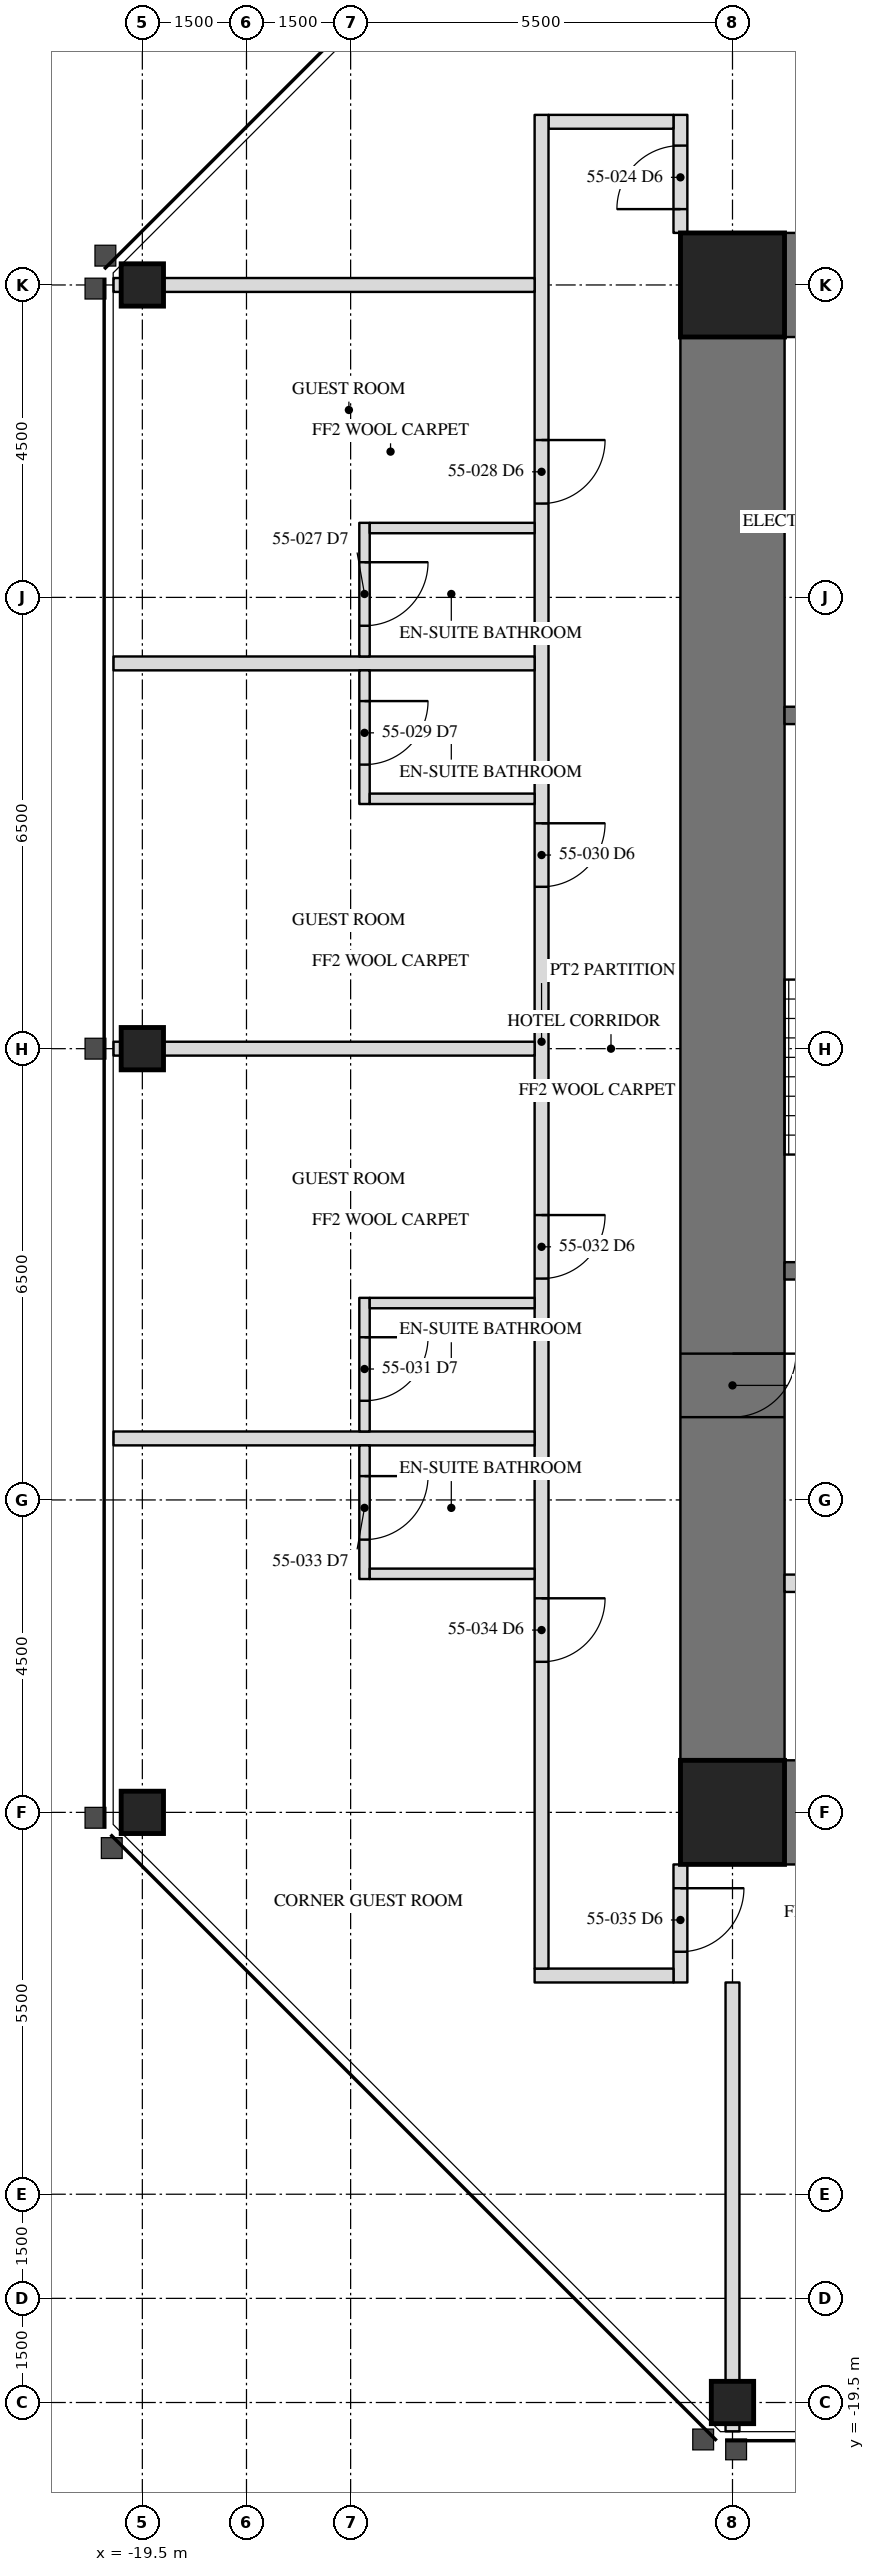
"""IFC4 building model, lengths in metres.
Left out: names, types, materials, properties, quantities, classifications, styles, units other than length and angle.
Written with IfcOpenShell. Run it as: python <this file> out.ifc"""

import sys

from ifc_helpers import new_model, si_unit, direction, frame, frame_2d, origin, origin_2d, place, context, subcontext, project, spatial, rectangle, hollow_rectangle, extrude, element, fill, save


model = new_model("IFC4")
c1 = context("Model", 3, precision=1e-05, world=origin(), true_north=direction((0.0, 1.0)))
c2 = subcontext(c1, "Body", "Model", "MODEL_VIEW")
j1 = project(units=[si_unit("LENGTHUNIT", "METRE"), si_unit("PLANEANGLEUNIT", "RADIAN")], contexts=[c1])
p1 = place(None, origin())
s1 = spatial("IfcSite", under=j1, at=p1, CompositionType="ELEMENT")
p2 = place(p1, origin())
s2 = spatial("IfcBuilding", under=s1, at=p2, CompositionType="ELEMENT")
p3 = place(p2, frame((0.0, 0.0, 229.2)))
s3 = spatial("IfcBuildingStorey", under=s2, at=p3, CompositionType="ELEMENT", Elevation=229.2)
for number, where, z_axis, x_axis in (
    (1, (-19.5, 0.0, 0.0), (0.0, 0.0, 1.0), (0.0, 1.0, 0.0)),
    (2, (-19.5, -11.0, 0.0), (0.0, 0.0, 1.0), (0.0, 1.0, 0.0)),
    (3, (-11.0, -19.5, 0.0), (0.0, 0.0, 1.0), (1.0, 0.0, 0.0)),
    (4, (-19.5, 11.0, 0.0), (0.0, 0.0, 1.0), (0.0, 1.0, 0.0)),
):
    element("IfcColumn", number, at=place(p3, frame(where, z_axis=z_axis, x_axis=x_axis)), inside=s3, PredefinedType="COLUMN", context=c2, shape_type="SweptSolid", body=[
        extrude(hollow_rectangle(XDim=0.61, YDim=0.61, WallThickness=0.076, at=origin_2d()), origin(), (0.0, 0.0, 1.0), 3.5),
    ])
p4 = place(p3, frame((-11.0, 11.0, 0.0), z_axis=(0.0, 0.0, 1.0), x_axis=(0.0, -1.0, 0.0)))
e5 = element("IfcWall", 5, at=p4, inside=s3, PredefinedType="SHEAR", context=c2, shape_type="SweptSolid", body=[
    extrude(rectangle(XDim=22.0, YDim=1.5, at=frame_2d((11.0, 0.0))), origin(), (0.0, 0.0, 1.0), 3.5),
])
p5 = place(p4, frame((15.393, 0.0, 0.0)))
e6 = element("IfcOpeningElement", 6, at=p5, cuts=e5, PredefinedType="OPENING", context=c2, shape_type="SweptSolid", body=[
    extrude(rectangle(XDim=0.915, YDim=2.134, at=frame_2d((0.458, 1.067))), frame((0.0, 0.76, 0.0), z_axis=(0.0, -1.0, 0.0), x_axis=(1.0, 0.0, 0.0)), (0.0, 0.0, 1.0), 1.52),
])
for number, where, z_axis, x_axis in (
    (7, (-6.5, 11.0, 0.0), (0.0, 0.0, 1.0), (-1.0, 0.0, 0.0)),
    (8, (-11.0, -11.0, 0.0), (0.0, 0.0, 1.0), (1.0, 0.0, 0.0)),
):
    element("IfcWall", number, at=place(p3, frame(where, z_axis=z_axis, x_axis=x_axis)), inside=s3, PredefinedType="SHEAR", context=c2, shape_type="SweptSolid", body=[
        extrude(rectangle(XDim=4.5, YDim=1.5, at=frame_2d((2.25, 0.0))), origin(), (0.0, 0.0, 1.0), 3.5),
    ])
for number, where, z_axis, x_axis in (
    (9, (-11.0, 11.0, 0.0), (0.0, 0.0, 1.0), (1.0, 0.0, 0.0)),
    (10, (-11.0, -11.0, 0.0), (0.0, 0.0, 1.0), (1.0, 0.0, 0.0)),
):
    element("IfcColumn", number, at=place(p3, frame(where, z_axis=z_axis, x_axis=x_axis)), inside=s3, PredefinedType="COLUMN", context=c2, shape_type="SweptSolid", body=[
        extrude(hollow_rectangle(XDim=1.499, YDim=1.499, WallThickness=0.102, at=origin_2d()), origin(), (0.0, 0.0, 1.0), 3.5),
    ])
p6 = place(p3, frame((-6.95, 4.8, 0.0), z_axis=(0.0, 0.0, 1.0), x_axis=(-1.0, 0.0, 0.0)))
e11 = element("IfcWall", 11, at=p6, inside=s3, PredefinedType="SOLIDWALL", context=c2, shape_type="SweptSolid", body=[
    extrude(rectangle(XDim=3.3, YDim=0.25, at=frame_2d((1.65, 0.0))), origin(), (0.0, 0.0, 1.0), 3.31),
])
p7 = place(p3, frame((-6.95, -3.2, 0.0), z_axis=(0.0, 0.0, 1.0), x_axis=(-1.0, 0.0, 0.0)))
e12 = element("IfcWall", 12, at=p7, inside=s3, PredefinedType="SOLIDWALL", context=c2, shape_type="SweptSolid", body=[
    extrude(rectangle(XDim=3.3, YDim=0.25, at=frame_2d((1.65, 0.0))), origin(), (0.0, 0.0, 1.0), 3.31),
])
p8 = place(p7, frame((1.116, 0.0, 0.0)))
e13 = element("IfcOpeningElement", 13, at=p8, cuts=e12, PredefinedType="OPENING", context=c2, shape_type="SweptSolid", body=[
    extrude(rectangle(XDim=1.067, YDim=2.134, at=frame_2d((0.533, 1.067))), frame((0.0, 0.135, 0.0), z_axis=(0.0, -1.0, 0.0), x_axis=(1.0, 0.0, 0.0)), (0.0, 0.0, 1.0), 0.27),
])
p9 = place(p3, frame((-6.95, -7.7, 0.0), z_axis=(0.0, 0.0, 1.0), x_axis=(-1.0, 0.0, 0.0)))
e14 = element("IfcWall", 14, at=p9, inside=s3, PredefinedType="PARTITIONING", context=c2, shape_type="SweptSolid", body=[
    extrude(rectangle(XDim=3.3, YDim=0.25, at=frame_2d((1.65, 0.0))), origin(), (0.0, 0.0, 1.0), 3.31),
])
p10 = place(p9, frame((0.45, 0.0, 0.0)))
e15 = element("IfcOpeningElement", 15, at=p10, cuts=e14, PredefinedType="OPENING", context=c2, shape_type="SweptSolid", body=[
    extrude(rectangle(XDim=1.219, YDim=2.134, at=frame_2d((0.609, 1.067))), frame((0.0, 0.135, 0.0), z_axis=(0.0, -1.0, 0.0), x_axis=(1.0, 0.0, 0.0)), (0.0, 0.0, 1.0), 0.27),
])
p11 = place(p3, frame((-11.75, 11.75, 0.0), z_axis=(0.0, 0.0, 1.0), x_axis=(0.0, 1.0, 0.0)))
e16 = element("IfcWall", 16, at=p11, inside=s3, PredefinedType="PARTITIONING", context=c2, shape_type="SweptSolid", body=[
    extrude(rectangle(XDim=1.7, YDim=0.2, at=frame_2d((0.85, 0.0))), origin(), (0.0, 0.0, 1.0), 3.31),
])
p12 = place(p11, frame((0.343, 0.0, 0.0)))
e17 = element("IfcOpeningElement", 17, at=p12, cuts=e16, PredefinedType="OPENING", context=c2, shape_type="SweptSolid", body=[
    extrude(rectangle(XDim=0.915, YDim=2.134, at=frame_2d((0.458, 1.067))), frame((0.0, 0.11, 0.0), z_axis=(0.0, -1.0, 0.0), x_axis=(1.0, 0.0, 0.0)), (0.0, 0.0, 1.0), 0.22),
])
p13 = place(p3, frame((-11.85, 13.35, 0.0), z_axis=(0.0, 0.0, 1.0), x_axis=(-1.0, 0.0, 0.0)))
e18 = element("IfcWall", 18, at=p13, inside=s3, PredefinedType="PARTITIONING", context=c2, shape_type="SweptSolid", body=[
    extrude(rectangle(XDim=1.8, YDim=0.2, at=frame_2d((0.9, 0.0))), origin(), (0.0, 0.0, 1.0), 3.31),
])
p14 = place(p3, frame((-11.75, -11.75, 0.0), z_axis=(0.0, 0.0, 1.0), x_axis=(0.0, -1.0, 0.0)))
e19 = element("IfcWall", 19, at=p14, inside=s3, PredefinedType="PARTITIONING", context=c2, shape_type="SweptSolid", body=[
    extrude(rectangle(XDim=1.7, YDim=0.2, at=frame_2d((0.85, 0.0))), origin(), (0.0, 0.0, 1.0), 3.31),
])
p15 = place(p14, frame((0.343, 0.0, 0.0)))
e20 = element("IfcOpeningElement", 20, at=p15, cuts=e19, PredefinedType="OPENING", context=c2, shape_type="SweptSolid", body=[
    extrude(rectangle(XDim=0.915, YDim=2.134, at=frame_2d((0.458, 1.067))), frame((0.0, 0.11, 0.0), z_axis=(0.0, -1.0, 0.0), x_axis=(1.0, 0.0, 0.0)), (0.0, 0.0, 1.0), 0.22),
])
p16 = place(p3, frame((-13.85, -13.35, 0.0), z_axis=(0.0, 0.0, 1.0), x_axis=(1.0, 0.0, 0.0)))
e21 = element("IfcWall", 21, at=p16, inside=s3, PredefinedType="PARTITIONING", context=c2, shape_type="SweptSolid", body=[
    extrude(rectangle(XDim=2.0, YDim=0.2, at=frame_2d((1.0, 0.0))), origin(), (0.0, 0.0, 1.0), 3.31),
])
p17 = place(p3, frame((-13.75, 13.45, 0.0), z_axis=(0.0, 0.0, 1.0), x_axis=(0.0, -1.0, 0.0)))
e22 = element("IfcWall", 22, at=p17, inside=s3, PredefinedType="PARTITIONING", context=c2, shape_type="SweptSolid", body=[
    extrude(rectangle(XDim=26.7, YDim=0.2, at=frame_2d((13.35, 0.0))), origin(), (0.0, 0.0, 1.0), 3.31),
])
p18 = place(p17, frame((4.684, 0.0, 0.0)))
e23 = element("IfcOpeningElement", 23, at=p18, cuts=e22, PredefinedType="OPENING", context=c2, shape_type="SweptSolid", body=[
    extrude(rectangle(XDim=0.915, YDim=2.134, at=frame_2d((0.458, 1.067))), frame((0.0, 0.11, 0.0), z_axis=(0.0, -1.0, 0.0), x_axis=(1.0, 0.0, 0.0)), (0.0, 0.0, 1.0), 0.22),
])
p19 = place(p17, frame((10.204, 0.0, 0.0)))
e24 = element("IfcOpeningElement", 24, at=p19, cuts=e22, PredefinedType="OPENING", context=c2, shape_type="SweptSolid", body=[
    extrude(rectangle(XDim=0.915, YDim=2.134, at=frame_2d((0.458, 1.067))), frame((0.0, 0.11, 0.0), z_axis=(0.0, -1.0, 0.0), x_axis=(1.0, 0.0, 0.0)), (0.0, 0.0, 1.0), 0.22),
])
p20 = place(p17, frame((15.846, 0.0, 0.0)))
e25 = element("IfcOpeningElement", 25, at=p20, cuts=e22, PredefinedType="OPENING", context=c2, shape_type="SweptSolid", body=[
    extrude(rectangle(XDim=0.915, YDim=2.134, at=frame_2d((0.458, 1.067))), frame((0.0, 0.11, 0.0), z_axis=(0.0, -1.0, 0.0), x_axis=(1.0, 0.0, 0.0)), (0.0, 0.0, 1.0), 0.22),
])
p21 = place(p17, frame((21.366, 0.0, 0.0)))
e26 = element("IfcOpeningElement", 26, at=p21, cuts=e22, PredefinedType="OPENING", context=c2, shape_type="SweptSolid", body=[
    extrude(rectangle(XDim=0.915, YDim=2.134, at=frame_2d((0.458, 1.067))), frame((0.0, 0.11, 0.0), z_axis=(0.0, -1.0, 0.0), x_axis=(1.0, 0.0, 0.0)), (0.0, 0.0, 1.0), 0.22),
])
p22 = place(p3, frame((-13.85, 11.0, 0.0), z_axis=(0.0, 0.0, 1.0), x_axis=(-1.0, 0.0, 0.0)))
e27 = element("IfcWall", 27, at=p22, inside=s3, PredefinedType="PARTITIONING", context=c2, shape_type="SweptSolid", body=[
    extrude(rectangle(XDim=6.065, YDim=0.2, at=frame_2d((3.032, 0.0))), origin(), (0.0, 0.0, 1.0), 2.802),
])
p23 = place(p3, frame((-13.85, 5.549, 0.0), z_axis=(0.0, 0.0, 1.0), x_axis=(-1.0, 0.0, 0.0)))
e28 = element("IfcWall", 28, at=p23, inside=s3, PredefinedType="PARTITIONING", context=c2, shape_type="SweptSolid", body=[
    extrude(rectangle(XDim=6.065, YDim=0.2, at=frame_2d((3.032, 0.0))), origin(), (0.0, 0.0, 1.0), 3.31),
])
p24 = place(p3, frame((-13.85, 0.0, 0.0), z_axis=(0.0, 0.0, 1.0), x_axis=(-1.0, 0.0, 0.0)))
e29 = element("IfcWall", 29, at=p24, inside=s3, PredefinedType="PARTITIONING", context=c2, shape_type="SweptSolid", body=[
    extrude(rectangle(XDim=6.065, YDim=0.2, at=frame_2d((3.032, 0.0))), origin(), (0.0, 0.0, 1.0), 2.802),
])
p25 = place(p3, frame((-13.85, -5.614, 0.0), z_axis=(0.0, 0.0, 1.0), x_axis=(-1.0, 0.0, 0.0)))
e30 = element("IfcWall", 30, at=p25, inside=s3, PredefinedType="PARTITIONING", context=c2, shape_type="SweptSolid", body=[
    extrude(rectangle(XDim=6.065, YDim=0.2, at=frame_2d((3.032, 0.0))), origin(), (0.0, 0.0, 1.0), 3.31),
])
p26 = place(p3, frame((-16.3, 7.574, 0.0), z_axis=(0.0, 0.0, 1.0), x_axis=(0.0, -1.0, 0.0)))
e31 = element("IfcWall", 31, at=p26, inside=s3, PredefinedType="PARTITIONING", context=c2, shape_type="SweptSolid", body=[
    extrude(rectangle(XDim=1.925, YDim=0.15, at=frame_2d((0.962, 0.0))), origin(), (0.0, 0.0, 1.0), 3.31),
])
p27 = place(p26, frame((0.567, 0.0, 0.0)))
e32 = element("IfcOpeningElement", 32, at=p27, cuts=e31, PredefinedType="OPENING", context=c2, shape_type="SweptSolid", body=[
    extrude(rectangle(XDim=0.915, YDim=2.032, at=frame_2d((0.458, 1.016))), frame((0.0, 0.085, 0.0), z_axis=(0.0, -1.0, 0.0), x_axis=(1.0, 0.0, 0.0)), (0.0, 0.0, 1.0), 0.17),
])
p28 = place(p3, frame((-13.85, 7.499, 0.0), z_axis=(0.0, 0.0, 1.0), x_axis=(-1.0, 0.0, 0.0)))
e33 = element("IfcWall", 33, at=p28, inside=s3, PredefinedType="PARTITIONING", context=c2, shape_type="SweptSolid", body=[
    extrude(rectangle(XDim=2.375, YDim=0.15, at=frame_2d((1.188, 0.0))), origin(), (0.0, 0.0, 1.0), 3.31),
])
p29 = place(p3, frame((-16.3, 5.449, 0.0), z_axis=(0.0, 0.0, 1.0), x_axis=(0.0, -1.0, 0.0)))
e34 = element("IfcWall", 34, at=p29, inside=s3, PredefinedType="PARTITIONING", context=c2, shape_type="SweptSolid", body=[
    extrude(rectangle(XDim=1.925, YDim=0.15, at=frame_2d((0.962, 0.0))), origin(), (0.0, 0.0, 1.0), 3.31),
])
p30 = place(p29, frame((0.442, 0.0, 0.0)))
e35 = element("IfcOpeningElement", 35, at=p30, cuts=e34, PredefinedType="OPENING", context=c2, shape_type="SweptSolid", body=[
    extrude(rectangle(XDim=0.915, YDim=2.032, at=frame_2d((0.458, 1.016))), frame((0.0, 0.085, 0.0), z_axis=(0.0, -1.0, 0.0), x_axis=(1.0, 0.0, 0.0)), (0.0, 0.0, 1.0), 0.17),
])
p31 = place(p3, frame((-13.85, 3.599, 0.0), z_axis=(0.0, 0.0, 1.0), x_axis=(-1.0, 0.0, 0.0)))
e36 = element("IfcWall", 36, at=p31, inside=s3, PredefinedType="PARTITIONING", context=c2, shape_type="SweptSolid", body=[
    extrude(rectangle(XDim=2.375, YDim=0.15, at=frame_2d((1.188, 0.0))), origin(), (0.0, 0.0, 1.0), 2.703),
])
p32 = place(p3, frame((-16.3, -3.589, 0.0), z_axis=(0.0, 0.0, 1.0), x_axis=(0.0, -1.0, 0.0)))
e37 = element("IfcWall", 37, at=p32, inside=s3, PredefinedType="PARTITIONING", context=c2, shape_type="SweptSolid", body=[
    extrude(rectangle(XDim=1.925, YDim=0.15, at=frame_2d((0.962, 0.0))), origin(), (0.0, 0.0, 1.0), 3.31),
])
p33 = place(p32, frame((0.567, 0.0, 0.0)))
e38 = element("IfcOpeningElement", 38, at=p33, cuts=e37, PredefinedType="OPENING", context=c2, shape_type="SweptSolid", body=[
    extrude(rectangle(XDim=0.915, YDim=2.032, at=frame_2d((0.458, 1.016))), frame((0.0, 0.085, 0.0), z_axis=(0.0, -1.0, 0.0), x_axis=(1.0, 0.0, 0.0)), (0.0, 0.0, 1.0), 0.17),
])
p34 = place(p3, frame((-13.85, -3.664, 0.0), z_axis=(0.0, 0.0, 1.0), x_axis=(-1.0, 0.0, 0.0)))
e39 = element("IfcWall", 39, at=p34, inside=s3, PredefinedType="PARTITIONING", context=c2, shape_type="SweptSolid", body=[
    extrude(rectangle(XDim=2.375, YDim=0.15, at=frame_2d((1.188, 0.0))), origin(), (0.0, 0.0, 1.0), 2.703),
])
p35 = place(p3, frame((-16.3, -5.714, 0.0), z_axis=(0.0, 0.0, 1.0), x_axis=(0.0, -1.0, 0.0)))
e40 = element("IfcWall", 40, at=p35, inside=s3, PredefinedType="PARTITIONING", context=c2, shape_type="SweptSolid", body=[
    extrude(rectangle(XDim=1.925, YDim=0.15, at=frame_2d((0.962, 0.0))), origin(), (0.0, 0.0, 1.0), 3.31),
])
p36 = place(p35, frame((0.442, 0.0, 0.0)))
e41 = element("IfcOpeningElement", 41, at=p36, cuts=e40, PredefinedType="OPENING", context=c2, shape_type="SweptSolid", body=[
    extrude(rectangle(XDim=0.915, YDim=2.032, at=frame_2d((0.458, 1.016))), frame((0.0, 0.085, 0.0), z_axis=(0.0, -1.0, 0.0), x_axis=(1.0, 0.0, 0.0)), (0.0, 0.0, 1.0), 0.17),
])
p37 = place(p3, frame((-13.85, -7.564, 0.0), z_axis=(0.0, 0.0, 1.0), x_axis=(-1.0, 0.0, 0.0)))
e42 = element("IfcWall", 42, at=p37, inside=s3, PredefinedType="PARTITIONING", context=c2, shape_type="SweptSolid", body=[
    extrude(rectangle(XDim=2.375, YDim=0.15, at=frame_2d((1.188, 0.0))), origin(), (0.0, 0.0, 1.0), 3.31),
])
p38 = place(p3, frame((-11.0, -13.45, 0.0), z_axis=(0.0, 0.0, 1.0), x_axis=(0.0, -1.0, 0.0)))
e43 = element("IfcWall", 43, at=p38, inside=s3, PredefinedType="PARTITIONING", context=c2, shape_type="SweptSolid", body=[
    extrude(rectangle(XDim=6.465, YDim=0.2, at=frame_2d((3.232, 0.0))), origin(), (0.0, 0.0, 1.0), 2.802),
])
p39 = place(p5, origin())
e44 = element("IfcDoor", 44, at=p39, inside=s3, OperationType="SINGLE_SWING_RIGHT", PredefinedType="DOOR", context=c2, shape_type="SweptSolid", body=[
    extrude(rectangle(XDim=0.915, YDim=2.134, at=frame_2d((0.458, 1.067))), frame((0.0, -0.675, 0.0), z_axis=(0.0, -1.0, 0.0), x_axis=(1.0, 0.0, 0.0)), (0.0, 0.0, 1.0), 0.05),
])
fill(e6, e44)
p40 = place(p12, origin())
e45 = element("IfcDoor", 45, at=p40, inside=s3, OperationType="SINGLE_SWING_LEFT", PredefinedType="DOOR", context=c2, shape_type="SweptSolid", body=[
    extrude(rectangle(XDim=0.915, YDim=2.134, at=frame_2d((0.458, 1.067))), frame((0.0, 0.025, 0.0), z_axis=(0.0, -1.0, 0.0), x_axis=(1.0, 0.0, 0.0)), (0.0, 0.0, 1.0), 0.05),
])
fill(e17, e45)
p41 = place(p27, origin())
e46 = element("IfcDoor", 46, at=p41, inside=s3, OperationType="SINGLE_SWING_LEFT", PredefinedType="DOOR", context=c2, shape_type="SweptSolid", body=[
    extrude(rectangle(XDim=0.915, YDim=2.032, at=frame_2d((0.458, 1.016))), frame((0.0, 0.025, 0.0), z_axis=(0.0, -1.0, 0.0), x_axis=(1.0, 0.0, 0.0)), (0.0, 0.0, 1.0), 0.05),
])
fill(e32, e46)
p42 = place(p18, origin())
e47 = element("IfcDoor", 47, at=p42, inside=s3, OperationType="SINGLE_SWING_LEFT", PredefinedType="DOOR", context=c2, shape_type="SweptSolid", body=[
    extrude(rectangle(XDim=0.915, YDim=2.134, at=frame_2d((0.458, 1.067))), frame((0.0, 0.025, 0.0), z_axis=(0.0, -1.0, 0.0), x_axis=(1.0, 0.0, 0.0)), (0.0, 0.0, 1.0), 0.05),
])
fill(e23, e47)
p43 = place(p30, origin())
e48 = element("IfcDoor", 48, at=p43, inside=s3, OperationType="SINGLE_SWING_LEFT", PredefinedType="DOOR", context=c2, shape_type="SweptSolid", body=[
    extrude(rectangle(XDim=0.915, YDim=2.032, at=frame_2d((0.458, 1.016))), frame((0.0, 0.025, 0.0), z_axis=(0.0, -1.0, 0.0), x_axis=(1.0, 0.0, 0.0)), (0.0, 0.0, 1.0), 0.05),
])
fill(e35, e48)
p44 = place(p19, origin())
e49 = element("IfcDoor", 49, at=p44, inside=s3, OperationType="SINGLE_SWING_LEFT", PredefinedType="DOOR", context=c2, shape_type="SweptSolid", body=[
    extrude(rectangle(XDim=0.915, YDim=2.134, at=frame_2d((0.458, 1.067))), frame((0.0, 0.025, 0.0), z_axis=(0.0, -1.0, 0.0), x_axis=(1.0, 0.0, 0.0)), (0.0, 0.0, 1.0), 0.05),
])
fill(e24, e49)
p45 = place(p33, origin())
e50 = element("IfcDoor", 50, at=p45, inside=s3, OperationType="SINGLE_SWING_LEFT", PredefinedType="DOOR", context=c2, shape_type="SweptSolid", body=[
    extrude(rectangle(XDim=0.915, YDim=2.032, at=frame_2d((0.458, 1.016))), frame((0.0, 0.025, 0.0), z_axis=(0.0, -1.0, 0.0), x_axis=(1.0, 0.0, 0.0)), (0.0, 0.0, 1.0), 0.05),
])
fill(e38, e50)
p46 = place(p20, origin())
e51 = element("IfcDoor", 51, at=p46, inside=s3, OperationType="SINGLE_SWING_LEFT", PredefinedType="DOOR", context=c2, shape_type="SweptSolid", body=[
    extrude(rectangle(XDim=0.915, YDim=2.134, at=frame_2d((0.458, 1.067))), frame((0.0, 0.025, 0.0), z_axis=(0.0, -1.0, 0.0), x_axis=(1.0, 0.0, 0.0)), (0.0, 0.0, 1.0), 0.05),
])
fill(e25, e51)
p47 = place(p36, origin())
e52 = element("IfcDoor", 52, at=p47, inside=s3, OperationType="SINGLE_SWING_LEFT", PredefinedType="DOOR", context=c2, shape_type="SweptSolid", body=[
    extrude(rectangle(XDim=0.915, YDim=2.032, at=frame_2d((0.458, 1.016))), frame((0.0, 0.025, 0.0), z_axis=(0.0, -1.0, 0.0), x_axis=(1.0, 0.0, 0.0)), (0.0, 0.0, 1.0), 0.05),
])
fill(e41, e52)
p48 = place(p21, origin())
e53 = element("IfcDoor", 53, at=p48, inside=s3, OperationType="SINGLE_SWING_LEFT", PredefinedType="DOOR", context=c2, shape_type="SweptSolid", body=[
    extrude(rectangle(XDim=0.915, YDim=2.134, at=frame_2d((0.458, 1.067))), frame((0.0, 0.025, 0.0), z_axis=(0.0, -1.0, 0.0), x_axis=(1.0, 0.0, 0.0)), (0.0, 0.0, 1.0), 0.05),
])
fill(e26, e53)
p49 = place(p15, origin())
e54 = element("IfcDoor", 54, at=p49, inside=s3, OperationType="SINGLE_SWING_LEFT", PredefinedType="DOOR", context=c2, shape_type="SweptSolid", body=[
    extrude(rectangle(XDim=0.915, YDim=2.134, at=frame_2d((0.458, 1.067))), frame((0.0, 0.025, 0.0), z_axis=(0.0, -1.0, 0.0), x_axis=(1.0, 0.0, 0.0)), (0.0, 0.0, 1.0), 0.05),
])
fill(e20, e54)
save(model, sys.argv[1])
